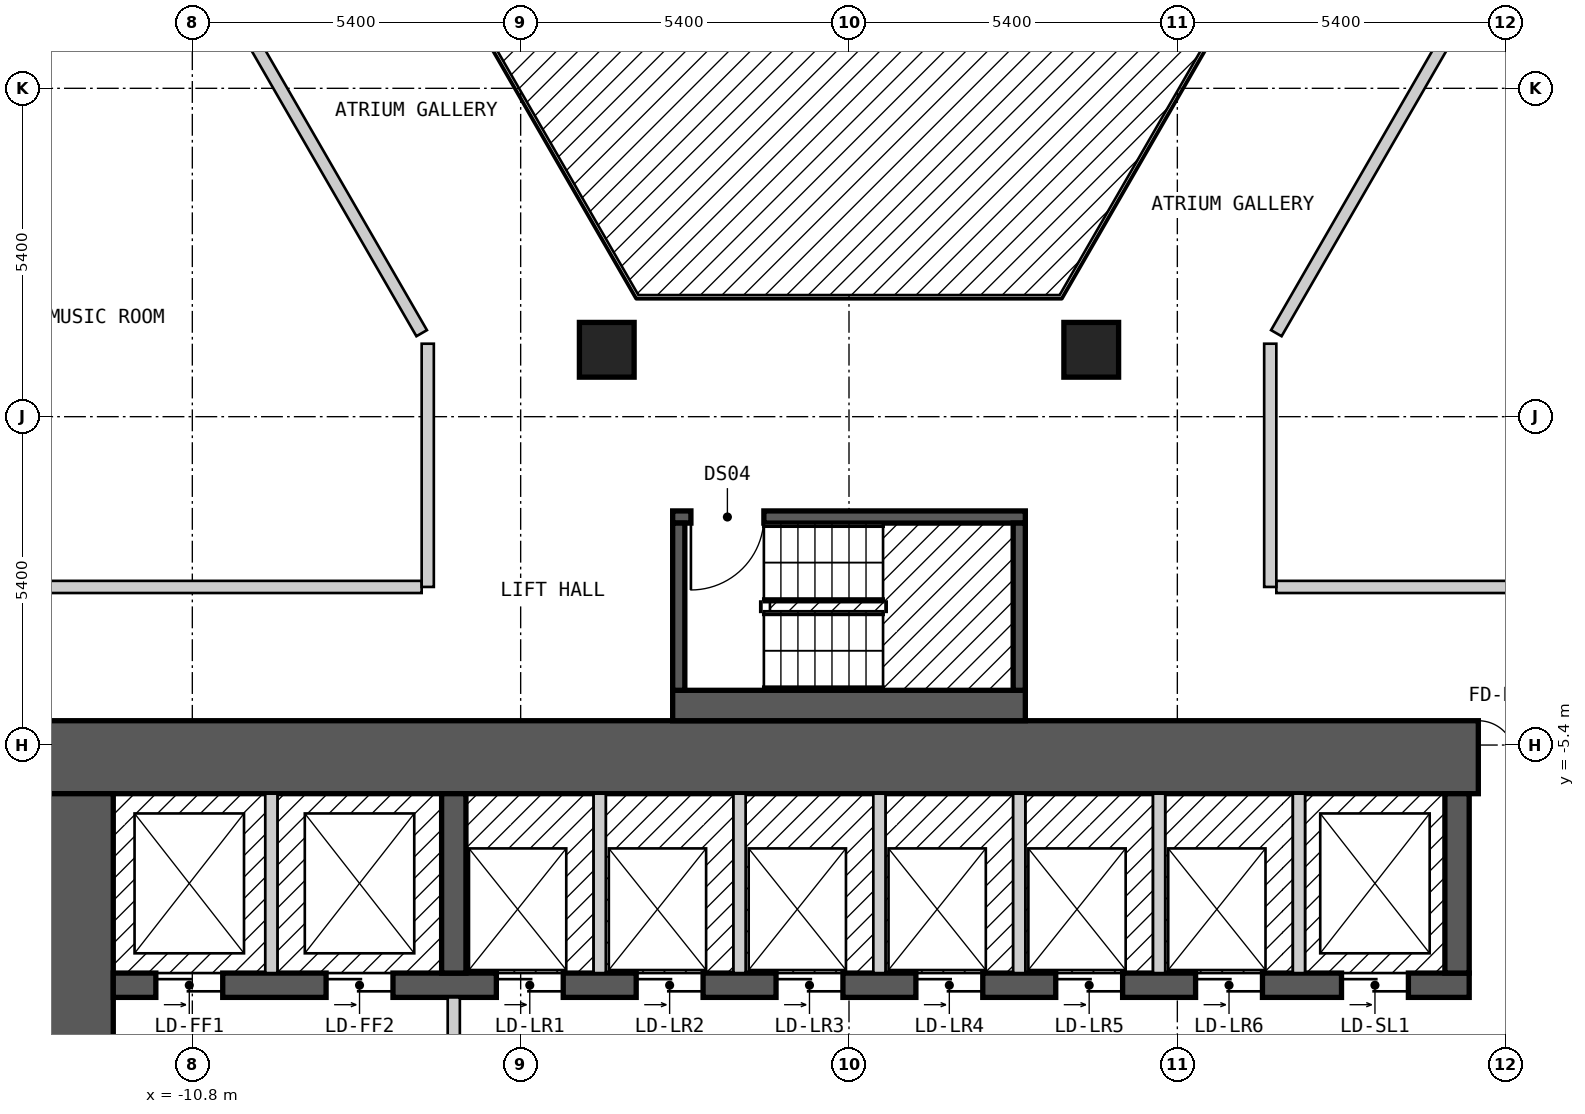
"""IFC4 building model, lengths in metres.
Left out: names, types, materials, properties, quantities, classifications, styles, units other than length and angle.
Written with IfcOpenShell. Run it as: python <this file> out.ifc"""

import sys

from ifc_helpers import new_model, si_unit, direction, frame, frame_2d, origin, origin_2d, place, context, subcontext, project, spatial, rectangle, extrude, element, fill, save


model = new_model("IFC4")
c1 = context("Model", 3, precision=1e-05, world=origin(), true_north=direction((0.0, 1.0)))
c2 = subcontext(c1, "Body", "Model", "MODEL_VIEW")
j1 = project(units=[si_unit("LENGTHUNIT", "METRE"), si_unit("PLANEANGLEUNIT", "RADIAN")], contexts=[c1])
p1 = place(None, origin())
s1 = spatial("IfcSite", under=j1, at=p1, CompositionType="ELEMENT")
p2 = place(p1, origin())
s2 = spatial("IfcBuilding", under=s1, at=p2, CompositionType="ELEMENT")
p3 = place(p2, frame((0.0, 0.0, 59.4)))
s3 = spatial("IfcBuildingStorey", under=s2, at=p3, CompositionType="ELEMENT", Elevation=59.4)
for number, where, z_axis, x_axis in (
    (1, (3.984, 1.1, 0.0), (0.0, 0.0, 1.0), (1.0, 0.0, 0.0)),
    (2, (-3.984, 1.1, 0.0), (0.0, 0.0, 1.0), (1.0, 0.0, 0.0)),
):
    element("IfcColumn", number, at=place(p3, frame(where, z_axis=z_axis, x_axis=x_axis)), inside=s3, PredefinedType="COLUMN", context=c2, shape_type="SweptSolid", body=[
        extrude(rectangle(XDim=0.9, YDim=0.9, at=origin_2d()), origin(), (0.0, 0.0, 1.0), 3.0),
    ])
p4 = place(p3, frame((-13.3, -5.6, 0.0), z_axis=(0.0, 0.0, 1.0), x_axis=(1.0, 0.0, 0.0)))
e3 = element("IfcWall", 3, at=p4, inside=s3, PredefinedType="SHEAR", context=c2, shape_type="SweptSolid", body=[
    extrude(rectangle(XDim=26.6, YDim=1.2, at=frame_2d((13.3, 0.0))), origin(), (0.0, 0.0, 1.0), 2.6),
])
p5 = place(p4, frame((23.65, 0.0, 0.0)))
e4 = element("IfcOpeningElement", 4, at=p5, cuts=e3, PredefinedType="OPENING", context=c2, shape_type="SweptSolid", body=[
    extrude(rectangle(XDim=1.2, YDim=2.1, at=frame_2d((0.6, 1.05))), frame((0.0, 0.61, 0.0), z_axis=(0.0, -1.0, 0.0), x_axis=(1.0, 0.0, 0.0)), (0.0, 0.0, 1.0), 1.22),
])
p6 = place(p3, frame((-12.7, -17.8, 0.0), z_axis=(0.0, 0.0, 1.0), x_axis=(0.0, 1.0, 0.0)))
e5 = element("IfcWall", 5, at=p6, inside=s3, PredefinedType="SHEAR", context=c2, shape_type="SweptSolid", body=[
    extrude(rectangle(XDim=11.6, YDim=1.2, at=frame_2d((5.8, 0.0))), origin(), (0.0, 0.0, 1.0), 2.6),
])
p7 = place(p6, frame((3.6, 0.0, 0.0)))
e6 = element("IfcOpeningElement", 6, at=p7, cuts=e5, PredefinedType="OPENING", context=c2, shape_type="SweptSolid", body=[
    extrude(rectangle(XDim=1.2, YDim=2.1, at=frame_2d((0.6, 1.05))), frame((0.0, 0.61, 0.0), z_axis=(0.0, -1.0, 0.0), x_axis=(1.0, 0.0, 0.0)), (0.0, 0.0, 1.0), 1.22),
])
p8 = place(p3, frame((-12.1, -9.35, 0.0), z_axis=(0.0, 0.0, 1.0), x_axis=(1.0, 0.0, 0.0)))
e7 = element("IfcWall", 7, at=p8, inside=s3, PredefinedType="SHEAR", context=c2, shape_type="SweptSolid", body=[
    extrude(rectangle(XDim=22.3, YDim=0.4, at=frame_2d((11.15, 0.0))), origin(), (0.0, 0.0, 1.0), 2.6),
])
p9 = place(p8, frame((0.7, 0.0, 0.0)))
e8 = element("IfcOpeningElement", 8, at=p9, cuts=e7, PredefinedType="OPENING", context=c2, shape_type="SweptSolid", body=[
    extrude(rectangle(XDim=1.1, YDim=2.1, at=frame_2d((0.55, 1.05))), frame((0.0, 0.21, 0.0), z_axis=(0.0, -1.0, 0.0), x_axis=(1.0, 0.0, 0.0)), (0.0, 0.0, 1.0), 0.42),
])
p10 = place(p8, frame((3.5, 0.0, 0.0)))
e9 = element("IfcOpeningElement", 9, at=p10, cuts=e7, PredefinedType="OPENING", context=c2, shape_type="SweptSolid", body=[
    extrude(rectangle(XDim=1.1, YDim=2.1, at=frame_2d((0.55, 1.05))), frame((0.0, 0.21, 0.0), z_axis=(0.0, -1.0, 0.0), x_axis=(1.0, 0.0, 0.0)), (0.0, 0.0, 1.0), 0.42),
])
p11 = place(p8, frame((6.3, 0.0, 0.0)))
e10 = element("IfcOpeningElement", 10, at=p11, cuts=e7, PredefinedType="OPENING", context=c2, shape_type="SweptSolid", body=[
    extrude(rectangle(XDim=1.1, YDim=2.1, at=frame_2d((0.55, 1.05))), frame((0.0, 0.21, 0.0), z_axis=(0.0, -1.0, 0.0), x_axis=(1.0, 0.0, 0.0)), (0.0, 0.0, 1.0), 0.42),
])
p12 = place(p8, frame((8.6, 0.0, 0.0)))
e11 = element("IfcOpeningElement", 11, at=p12, cuts=e7, PredefinedType="OPENING", context=c2, shape_type="SweptSolid", body=[
    extrude(rectangle(XDim=1.1, YDim=2.1, at=frame_2d((0.55, 1.05))), frame((0.0, 0.21, 0.0), z_axis=(0.0, -1.0, 0.0), x_axis=(1.0, 0.0, 0.0)), (0.0, 0.0, 1.0), 0.42),
])
p13 = place(p8, frame((10.9, 0.0, 0.0)))
e12 = element("IfcOpeningElement", 12, at=p13, cuts=e7, PredefinedType="OPENING", context=c2, shape_type="SweptSolid", body=[
    extrude(rectangle(XDim=1.1, YDim=2.1, at=frame_2d((0.55, 1.05))), frame((0.0, 0.21, 0.0), z_axis=(0.0, -1.0, 0.0), x_axis=(1.0, 0.0, 0.0)), (0.0, 0.0, 1.0), 0.42),
])
p14 = place(p8, frame((13.2, 0.0, 0.0)))
e13 = element("IfcOpeningElement", 13, at=p14, cuts=e7, PredefinedType="OPENING", context=c2, shape_type="SweptSolid", body=[
    extrude(rectangle(XDim=1.1, YDim=2.1, at=frame_2d((0.55, 1.05))), frame((0.0, 0.21, 0.0), z_axis=(0.0, -1.0, 0.0), x_axis=(1.0, 0.0, 0.0)), (0.0, 0.0, 1.0), 0.42),
])
p15 = place(p8, frame((15.5, 0.0, 0.0)))
e14 = element("IfcOpeningElement", 14, at=p15, cuts=e7, PredefinedType="OPENING", context=c2, shape_type="SweptSolid", body=[
    extrude(rectangle(XDim=1.1, YDim=2.1, at=frame_2d((0.55, 1.05))), frame((0.0, 0.21, 0.0), z_axis=(0.0, -1.0, 0.0), x_axis=(1.0, 0.0, 0.0)), (0.0, 0.0, 1.0), 0.42),
])
p16 = place(p8, frame((17.8, 0.0, 0.0)))
e15 = element("IfcOpeningElement", 15, at=p16, cuts=e7, PredefinedType="OPENING", context=c2, shape_type="SweptSolid", body=[
    extrude(rectangle(XDim=1.1, YDim=2.1, at=frame_2d((0.55, 1.05))), frame((0.0, 0.21, 0.0), z_axis=(0.0, -1.0, 0.0), x_axis=(1.0, 0.0, 0.0)), (0.0, 0.0, 1.0), 0.42),
])
p17 = place(p8, frame((20.2, 0.0, 0.0)))
e16 = element("IfcOpeningElement", 16, at=p17, cuts=e7, PredefinedType="OPENING", context=c2, shape_type="SweptSolid", body=[
    extrude(rectangle(XDim=1.1, YDim=2.1, at=frame_2d((0.55, 1.05))), frame((0.0, 0.21, 0.0), z_axis=(0.0, -1.0, 0.0), x_axis=(1.0, 0.0, 0.0)), (0.0, 0.0, 1.0), 0.42),
])
for number, where, z_axis, x_axis in (
    (17, (-6.5, -9.15, 0.0), (0.0, 0.0, 1.0), (0.0, 1.0, 0.0)),
    (18, (10.0, -9.15, 0.0), (0.0, 0.0, 1.0), (0.0, 1.0, 0.0)),
):
    element("IfcWall", number, at=place(p3, frame(where, z_axis=z_axis, x_axis=x_axis)), inside=s3, PredefinedType="SHEAR", context=c2, shape_type="SweptSolid", body=[
        extrude(rectangle(XDim=2.95, YDim=0.4, at=frame_2d((1.475, 0.0))), origin(), (0.0, 0.0, 1.0), 2.6),
    ])
p18 = place(p3, frame((-2.9, -4.75, 0.0), z_axis=(0.0, 0.0, 1.0), x_axis=(1.0, 0.0, 0.0)))
e19 = element("IfcWall", 19, at=p18, inside=s3, PredefinedType="SOLIDWALL", context=c2, shape_type="SweptSolid", body=[
    extrude(rectangle(XDim=5.8, YDim=0.5, at=frame_2d((2.9, 0.0))), origin(), (0.0, 0.0, 1.0), 2.6),
])
p19 = place(p3, frame((-2.9, -1.65, 0.0), z_axis=(0.0, 0.0, 1.0), x_axis=(1.0, 0.0, 0.0)))
e20 = element("IfcWall", 20, at=p19, inside=s3, PredefinedType="SOLIDWALL", context=c2, shape_type="SweptSolid", body=[
    extrude(rectangle(XDim=5.8, YDim=0.2, at=frame_2d((2.9, 0.0))), origin(), (0.0, 0.0, 1.0), 2.6),
])
p20 = place(p19, frame((0.3, 0.0, 0.0)))
e21 = element("IfcOpeningElement", 21, at=p20, cuts=e20, PredefinedType="OPENING", context=c2, shape_type="SweptSolid", body=[
    extrude(rectangle(XDim=1.2, YDim=2.1, at=frame_2d((0.6, 1.05))), frame((0.0, 0.11, 0.0), z_axis=(0.0, -1.0, 0.0), x_axis=(1.0, 0.0, 0.0)), (0.0, 0.0, 1.0), 0.22),
])
for number, where, z_axis, x_axis in (
    (22, (-2.8, -4.5, 0.0), (0.0, 0.0, 1.0), (0.0, 1.0, 0.0)),
    (23, (2.8, -4.5, 0.0), (0.0, 0.0, 1.0), (0.0, 1.0, 0.0)),
):
    element("IfcWall", number, at=place(p3, frame(where, z_axis=z_axis, x_axis=x_axis)), inside=s3, PredefinedType="SOLIDWALL", context=c2, shape_type="SweptSolid", body=[
        extrude(rectangle(XDim=2.75, YDim=0.2, at=frame_2d((1.375, 0.0))), origin(), (0.0, 0.0, 1.0), 2.6),
    ])
p21 = place(p3, frame((-10.796, 7.9, 0.0), z_axis=(0.0, 0.0, 1.0), x_axis=(0.499954271211, -0.866051803703, 0.0)))
e24 = element("IfcWall", 24, at=p21, inside=s3, PredefinedType="PARTITIONING", context=c2, shape_type="SweptSolid", body=[
    extrude(rectangle(XDim=7.536, YDim=0.2, at=frame_2d((3.768, 0.0))), origin(), (0.0, 0.0, 1.0), 2.6),
])
p22 = place(p3, frame((9.18, 15.7, 0.0), z_axis=(0.0, 0.0, 1.0), x_axis=(0.500003652032, -0.866023295272, 0.0)))
e25 = element("IfcWall", 25, at=p22, inside=s3, PredefinedType="PARTITIONING", context=c2, shape_type="SweptSolid", body=[
    extrude(rectangle(XDim=18.012, YDim=0.2, at=frame_2d((9.006, 0.0))), origin(), (0.0, 0.0, 1.0), 2.6),
])
p23 = place(p22, frame((8.556, 0.0, 0.0)))
e26 = element("IfcOpeningElement", 26, at=p23, cuts=e25, PredefinedType="OPENING", context=c2, shape_type="SweptSolid", body=[
    extrude(rectangle(XDim=0.9, YDim=2.1, at=frame_2d((0.45, 1.05))), frame((0.0, 0.11, 0.0), z_axis=(0.0, -1.0, 0.0), x_axis=(1.0, 0.0, 0.0)), (0.0, 0.0, 1.0), 0.22),
])
p24 = place(p3, frame((10.45, 17.9, 0.0), z_axis=(0.0, 0.0, 1.0), x_axis=(0.500034352617, -0.866005569383, 0.0)))
e27 = element("IfcWall", 27, at=p24, inside=s3, PredefinedType="PARTITIONING", context=c2, shape_type="SweptSolid", body=[
    extrude(rectangle(XDim=20.553, YDim=0.2, at=frame_2d((10.276, 0.0))), origin(), (0.0, 0.0, 1.0), 2.6),
])
p25 = place(p24, frame((14.903, 0.0, 0.0)))
e28 = element("IfcOpeningElement", 28, at=p25, cuts=e27, PredefinedType="OPENING", context=c2, shape_type="SweptSolid", body=[
    extrude(rectangle(XDim=1.0, YDim=2.1, at=frame_2d((0.5, 1.05))), frame((0.0, 0.11, 0.0), z_axis=(0.0, -1.0, 0.0), x_axis=(1.0, 0.0, 0.0)), (0.0, 0.0, 1.0), 0.22),
])
p26 = place(p24, frame((9.775, 0.0, 0.0)))
e29 = element("IfcOpeningElement", 29, at=p26, cuts=e27, PredefinedType="OPENING", context=c2, shape_type="SweptSolid", body=[
    extrude(rectangle(XDim=1.0, YDim=2.1, at=frame_2d((0.5, 1.05))), frame((0.0, 0.11, 0.0), z_axis=(0.0, -1.0, 0.0), x_axis=(1.0, 0.0, 0.0)), (0.0, 0.0, 1.0), 0.22),
])
p27 = place(p24, frame((0.852, 0.0, 0.0)))
e30 = element("IfcOpeningElement", 30, at=p27, cuts=e27, PredefinedType="OPENING", context=c2, shape_type="SweptSolid", body=[
    extrude(rectangle(XDim=0.8, YDim=2.1, at=frame_2d((0.4, 1.05))), frame((0.0, 0.11, 0.0), z_axis=(0.0, -1.0, 0.0), x_axis=(1.0, 0.0, 0.0)), (0.0, 0.0, 1.0), 0.22),
])
for number, where, z_axis, x_axis in (
    (31, (-15.4, -2.8, 0.0), (0.0, 0.0, 1.0), (1.0, 0.0, 0.0)),
    (32, (7.028, -2.8, 0.0), (0.0, 0.0, 1.0), (1.0, 0.0, 0.0)),
):
    element("IfcWall", number, at=place(p3, frame(where, z_axis=z_axis, x_axis=x_axis)), inside=s3, PredefinedType="PARTITIONING", context=c2, shape_type="SweptSolid", body=[
        extrude(rectangle(XDim=8.372, YDim=0.2, at=frame_2d((4.186, 0.0))), origin(), (0.0, 0.0, 1.0), 2.6),
    ])
p28 = place(p3, frame((7.028, 1.373, 0.0), z_axis=(0.0, 0.0, 1.0), x_axis=(0.49998574534, 0.86603363356, 0.0)))
e33 = element("IfcWall", 33, at=p28, inside=s3, PredefinedType="PARTITIONING", context=c2, shape_type="SweptSolid", body=[
    extrude(rectangle(XDim=7.652, YDim=0.2, at=frame_2d((3.826, 0.0))), origin(), (0.0, 0.0, 1.0), 2.6),
])
p29 = place(p3, frame((-18.244, -0.001, 0.0), z_axis=(0.0, 0.0, 1.0), x_axis=(0.499962999376, 0.866046765051, 0.0)))
e34 = element("IfcWall", 34, at=p29, inside=s3, PredefinedType="PARTITIONING", context=c2, shape_type="SweptSolid", body=[
    extrude(rectangle(XDim=18.245, YDim=0.2, at=frame_2d((9.123, 0.0))), origin(), (0.0, 0.0, 1.0), 2.6),
])
p30 = place(p29, frame((8.672, 0.0, 0.0)))
e35 = element("IfcOpeningElement", 35, at=p30, cuts=e34, PredefinedType="OPENING", context=c2, shape_type="SweptSolid", body=[
    extrude(rectangle(XDim=0.9, YDim=2.1, at=frame_2d((0.45, 1.05))), frame((0.0, 0.11, 0.0), z_axis=(0.0, -1.0, 0.0), x_axis=(1.0, 0.0, 0.0)), (0.0, 0.0, 1.0), 0.22),
])
p31 = place(p3, frame((-20.727, 0.099, 0.0), z_axis=(0.0, 0.0, 1.0), x_axis=(0.499993204491, 0.866029327138, 0.0)))
e36 = element("IfcWall", 36, at=p31, inside=s3, PredefinedType="PARTITIONING", context=c2, shape_type="SweptSolid", body=[
    extrude(rectangle(XDim=20.554, YDim=0.2, at=frame_2d((10.277, 0.0))), origin(), (0.0, 0.0, 1.0), 2.6),
])
p32 = place(p31, frame((14.88, 0.0, 0.0)))
e37 = element("IfcOpeningElement", 37, at=p32, cuts=e36, PredefinedType="OPENING", context=c2, shape_type="SweptSolid", body=[
    extrude(rectangle(XDim=1.0, YDim=2.1, at=frame_2d((0.5, 1.05))), frame((0.0, 0.11, 0.0), z_axis=(0.0, -1.0, 0.0), x_axis=(1.0, 0.0, 0.0)), (0.0, 0.0, 1.0), 0.22),
])
p33 = place(p31, frame((4.673, 0.0, 0.0)))
e38 = element("IfcOpeningElement", 38, at=p33, cuts=e36, PredefinedType="OPENING", context=c2, shape_type="SweptSolid", body=[
    extrude(rectangle(XDim=1.0, YDim=2.1, at=frame_2d((0.5, 1.05))), frame((0.0, 0.11, 0.0), z_axis=(0.0, -1.0, 0.0), x_axis=(1.0, 0.0, 0.0)), (0.0, 0.0, 1.0), 0.22),
])
p34 = place(p31, frame((0.838, 0.0, 0.0)))
e39 = element("IfcOpeningElement", 39, at=p34, cuts=e36, PredefinedType="OPENING", context=c2, shape_type="SweptSolid", body=[
    extrude(rectangle(XDim=0.8, YDim=2.1, at=frame_2d((0.4, 1.05))), frame((0.0, 0.11, 0.0), z_axis=(0.0, -1.0, 0.0), x_axis=(1.0, 0.0, 0.0)), (0.0, 0.0, 1.0), 0.22),
])
for number, where, z_axis, x_axis in (
    (40, (6.928, -2.8, 0.0), (0.0, 0.0, 1.0), (0.0, 1.0, 0.0)),
    (41, (-6.928, -2.8, 0.0), (0.0, 0.0, 1.0), (0.0, 1.0, 0.0)),
):
    element("IfcWall", number, at=place(p3, frame(where, z_axis=z_axis, x_axis=x_axis)), inside=s3, PredefinedType="PARTITIONING", context=c2, shape_type="SweptSolid", body=[
        extrude(rectangle(XDim=4.0, YDim=0.2, at=frame_2d((2.0, 0.0))), origin(), (0.0, 0.0, 1.0), 2.6),
    ])
p35 = place(p3, frame((-9.5, -9.15, 0.0), z_axis=(0.0, 0.0, 1.0), x_axis=(0.0, 1.0, 0.0)))
e42 = element("IfcWall", 42, at=p35, inside=s3, PredefinedType="SOLIDWALL", context=c2, shape_type="SweptSolid", body=[
    extrude(rectangle(XDim=2.95, YDim=0.2, at=frame_2d((1.475, 0.0))), origin(), (0.0, 0.0, 1.0), 2.6),
])
p36 = place(p3, frame((-6.5, -14.45, 0.0), z_axis=(0.0, 0.0, 1.0), x_axis=(0.0, 1.0, 0.0)))
e43 = element("IfcWall", 43, at=p36, inside=s3, PredefinedType="PARTITIONING", context=c2, shape_type="SweptSolid", body=[
    extrude(rectangle(XDim=4.9, YDim=0.2, at=frame_2d((2.45, 0.0))), origin(), (0.0, 0.0, 1.0), 2.6),
])
p37 = place(p36, frame((3.15, 0.0, 0.0), z_axis=(0.0, 0.0, 1.0), x_axis=(-1.0, 0.0, 0.0)))
e44 = element("IfcOpeningElement", 44, at=p37, cuts=e43, PredefinedType="OPENING", context=c2, shape_type="SweptSolid", body=[
    extrude(rectangle(XDim=1.4, YDim=2.1, at=frame_2d((0.7, 1.05))), frame((0.0, 0.11, 0.0), z_axis=(0.0, -1.0, 0.0), x_axis=(1.0, 0.0, 0.0)), (0.0, 0.0, 1.0), 0.22),
])
for number, where, z_axis, x_axis in (
    (45, (-4.1, -9.15, 0.0), (0.0, 0.0, 1.0), (0.0, 1.0, 0.0)),
    (46, (-1.8, -9.15, 0.0), (0.0, 0.0, 1.0), (0.0, 1.0, 0.0)),
    (47, (0.5, -9.15, 0.0), (0.0, 0.0, 1.0), (0.0, 1.0, 0.0)),
    (48, (2.8, -9.15, 0.0), (0.0, 0.0, 1.0), (0.0, 1.0, 0.0)),
    (49, (5.1, -9.15, 0.0), (0.0, 0.0, 1.0), (0.0, 1.0, 0.0)),
    (50, (7.4, -9.15, 0.0), (0.0, 0.0, 1.0), (0.0, 1.0, 0.0)),
):
    element("IfcWall", number, at=place(p3, frame(where, z_axis=z_axis, x_axis=x_axis)), inside=s3, PredefinedType="SOLIDWALL", context=c2, shape_type="SweptSolid", body=[
        extrude(rectangle(XDim=2.95, YDim=0.2, at=frame_2d((1.475, 0.0))), origin(), (0.0, 0.0, 1.0), 2.6),
    ])
p38 = place(p20, origin())
e51 = element("IfcDoor", 51, at=p38, inside=s3, OperationType="SINGLE_SWING_LEFT", PredefinedType="DOOR", context=c2, shape_type="SweptSolid", body=[
    extrude(rectangle(XDim=1.2, YDim=2.1, at=frame_2d((0.6, 1.05))), frame((0.0, 0.025, 0.0), z_axis=(0.0, -1.0, 0.0), x_axis=(1.0, 0.0, 0.0)), (0.0, 0.0, 1.0), 0.05),
])
fill(e21, e51)
p39 = place(p9, origin())
e52 = element("IfcDoor", 52, at=p39, inside=s3, OperationType="DOUBLE_DOOR_SLIDING", PredefinedType="DOOR", context=c2, shape_type="SweptSolid", body=[
    extrude(rectangle(XDim=1.1, YDim=2.1, at=frame_2d((0.55, 1.05))), frame((0.0, 0.025, 0.0), z_axis=(0.0, -1.0, 0.0), x_axis=(1.0, 0.0, 0.0)), (0.0, 0.0, 1.0), 0.05),
])
fill(e8, e52)
p40 = place(p10, origin())
e53 = element("IfcDoor", 53, at=p40, inside=s3, OperationType="DOUBLE_DOOR_SLIDING", PredefinedType="DOOR", context=c2, shape_type="SweptSolid", body=[
    extrude(rectangle(XDim=1.1, YDim=2.1, at=frame_2d((0.55, 1.05))), frame((0.0, 0.025, 0.0), z_axis=(0.0, -1.0, 0.0), x_axis=(1.0, 0.0, 0.0)), (0.0, 0.0, 1.0), 0.05),
])
fill(e9, e53)
p41 = place(p11, origin())
e54 = element("IfcDoor", 54, at=p41, inside=s3, OperationType="DOUBLE_DOOR_SLIDING", PredefinedType="DOOR", context=c2, shape_type="SweptSolid", body=[
    extrude(rectangle(XDim=1.1, YDim=2.1, at=frame_2d((0.55, 1.05))), frame((0.0, 0.025, 0.0), z_axis=(0.0, -1.0, 0.0), x_axis=(1.0, 0.0, 0.0)), (0.0, 0.0, 1.0), 0.05),
])
fill(e10, e54)
p42 = place(p12, origin())
e55 = element("IfcDoor", 55, at=p42, inside=s3, OperationType="DOUBLE_DOOR_SLIDING", PredefinedType="DOOR", context=c2, shape_type="SweptSolid", body=[
    extrude(rectangle(XDim=1.1, YDim=2.1, at=frame_2d((0.55, 1.05))), frame((0.0, 0.025, 0.0), z_axis=(0.0, -1.0, 0.0), x_axis=(1.0, 0.0, 0.0)), (0.0, 0.0, 1.0), 0.05),
])
fill(e11, e55)
p43 = place(p13, origin())
e56 = element("IfcDoor", 56, at=p43, inside=s3, OperationType="DOUBLE_DOOR_SLIDING", PredefinedType="DOOR", context=c2, shape_type="SweptSolid", body=[
    extrude(rectangle(XDim=1.1, YDim=2.1, at=frame_2d((0.55, 1.05))), frame((0.0, 0.025, 0.0), z_axis=(0.0, -1.0, 0.0), x_axis=(1.0, 0.0, 0.0)), (0.0, 0.0, 1.0), 0.05),
])
fill(e12, e56)
p44 = place(p14, origin())
e57 = element("IfcDoor", 57, at=p44, inside=s3, OperationType="DOUBLE_DOOR_SLIDING", PredefinedType="DOOR", context=c2, shape_type="SweptSolid", body=[
    extrude(rectangle(XDim=1.1, YDim=2.1, at=frame_2d((0.55, 1.05))), frame((0.0, 0.025, 0.0), z_axis=(0.0, -1.0, 0.0), x_axis=(1.0, 0.0, 0.0)), (0.0, 0.0, 1.0), 0.05),
])
fill(e13, e57)
p45 = place(p15, origin())
e58 = element("IfcDoor", 58, at=p45, inside=s3, OperationType="DOUBLE_DOOR_SLIDING", PredefinedType="DOOR", context=c2, shape_type="SweptSolid", body=[
    extrude(rectangle(XDim=1.1, YDim=2.1, at=frame_2d((0.55, 1.05))), frame((0.0, 0.025, 0.0), z_axis=(0.0, -1.0, 0.0), x_axis=(1.0, 0.0, 0.0)), (0.0, 0.0, 1.0), 0.05),
])
fill(e14, e58)
p46 = place(p16, origin())
e59 = element("IfcDoor", 59, at=p46, inside=s3, OperationType="DOUBLE_DOOR_SLIDING", PredefinedType="DOOR", context=c2, shape_type="SweptSolid", body=[
    extrude(rectangle(XDim=1.1, YDim=2.1, at=frame_2d((0.55, 1.05))), frame((0.0, 0.025, 0.0), z_axis=(0.0, -1.0, 0.0), x_axis=(1.0, 0.0, 0.0)), (0.0, 0.0, 1.0), 0.05),
])
fill(e15, e59)
p47 = place(p17, origin())
e60 = element("IfcDoor", 60, at=p47, inside=s3, OperationType="DOUBLE_DOOR_SLIDING", PredefinedType="DOOR", context=c2, shape_type="SweptSolid", body=[
    extrude(rectangle(XDim=1.1, YDim=2.1, at=frame_2d((0.55, 1.05))), frame((0.0, 0.025, 0.0), z_axis=(0.0, -1.0, 0.0), x_axis=(1.0, 0.0, 0.0)), (0.0, 0.0, 1.0), 0.05),
])
fill(e16, e60)
p48 = place(p5, origin())
e61 = element("IfcDoor", 61, at=p48, inside=s3, OperationType="DOUBLE_DOOR_SINGLE_SWING", PredefinedType="DOOR", context=c2, shape_type="SweptSolid", body=[
    extrude(rectangle(XDim=1.2, YDim=2.1, at=frame_2d((0.6, 1.05))), frame((0.0, 0.025, 0.0), z_axis=(0.0, -1.0, 0.0), x_axis=(1.0, 0.0, 0.0)), (0.0, 0.0, 1.0), 0.05),
])
fill(e4, e61)
save(model, sys.argv[1])
